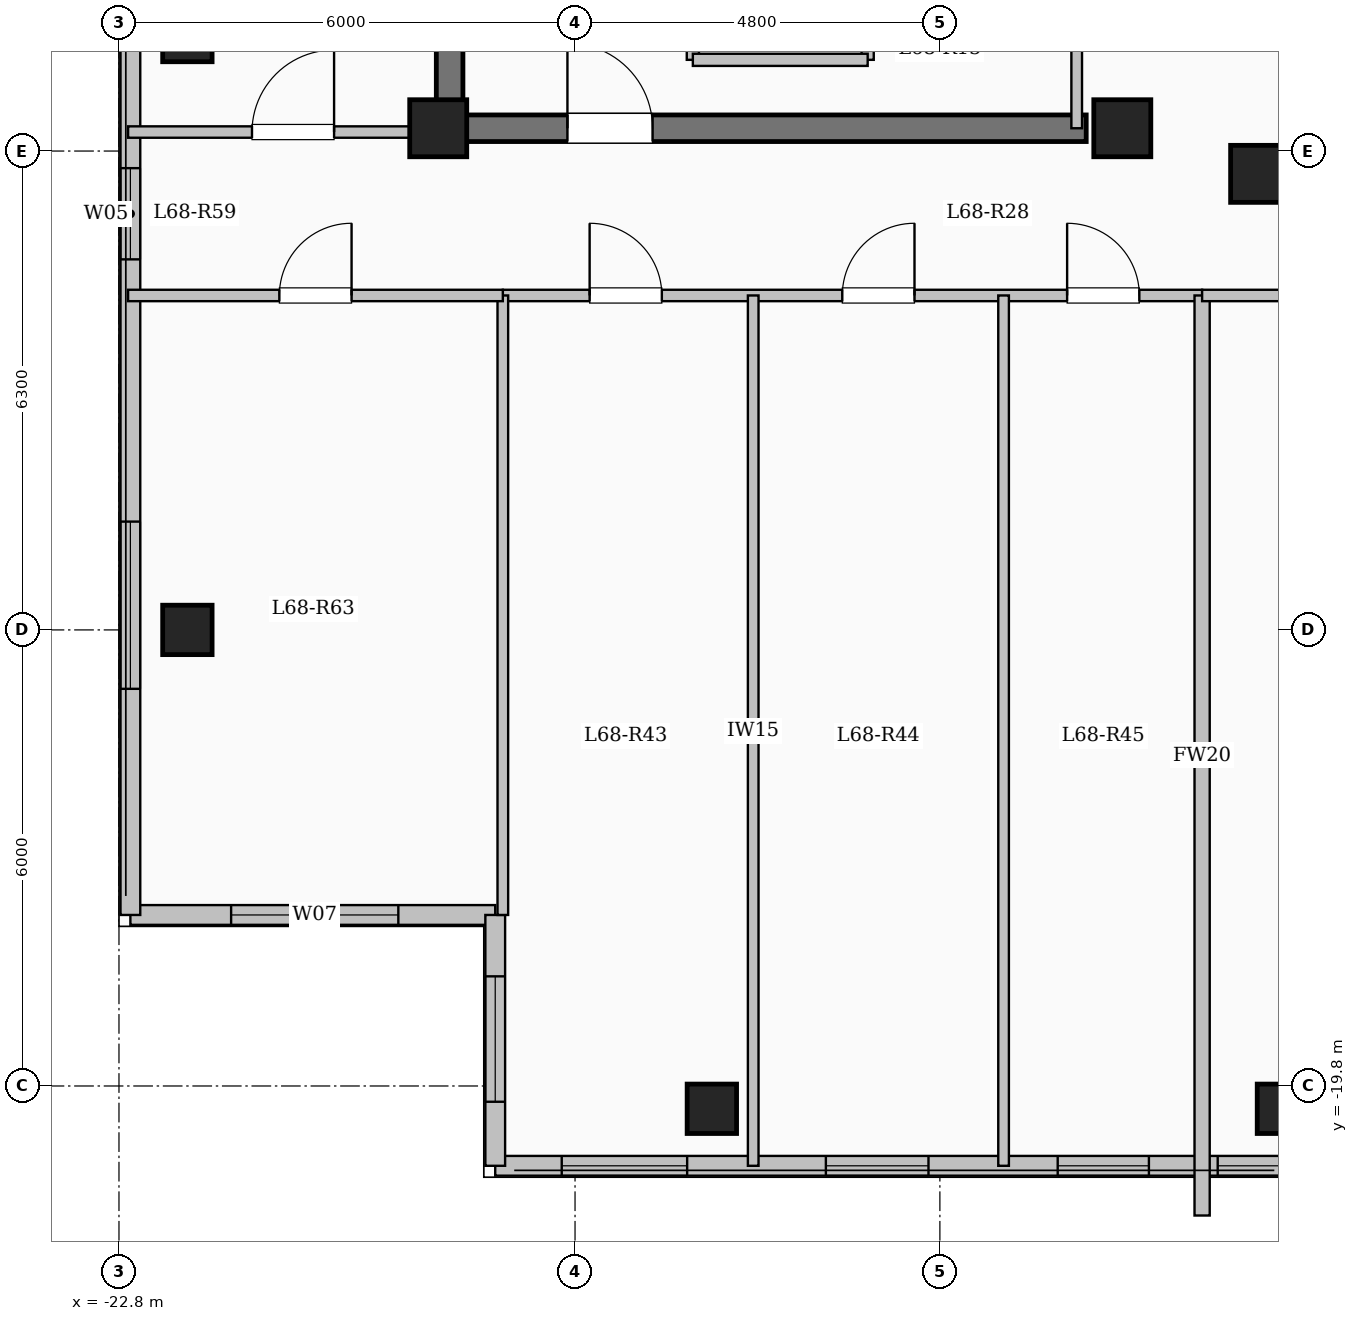
"""IFC4 building model, lengths in metres.
Left out: names, types, materials, properties, quantities, classifications, styles, units other than length and angle.
Written with IfcOpenShell. Run it as: python <this file> out.ifc"""

import sys

from ifc_helpers import new_model, si_unit, direction, frame, frame_2d, origin, origin_2d, place, context, subcontext, project, spatial, rectangle, extrude, element, fill, save


model = new_model("IFC4")
c1 = context("Model", 3, precision=1e-05, world=origin(), true_north=direction((0.0, 1.0)))
c2 = subcontext(c1, "Body", "Model", "MODEL_VIEW")
j1 = project(units=[si_unit("LENGTHUNIT", "METRE"), si_unit("PLANEANGLEUNIT", "RADIAN")], contexts=[c1])
p1 = place(None, origin())
s1 = spatial("IfcSite", under=j1, at=p1, CompositionType="ELEMENT")
p2 = place(p1, origin())
s2 = spatial("IfcBuilding", under=s1, at=p2, CompositionType="ELEMENT")
p3 = place(p2, frame((0.0, 0.0, 251.55)))
s3 = spatial("IfcBuildingStorey", under=s2, at=p3, CompositionType="ELEMENT", Elevation=251.55)
for number, where, z_axis, x_axis in (
    (1, (-7.8, -7.8, 0.0), (0.0, 0.0, 1.0), (1.0, 0.0, 0.0)),
    (2, (-9.6, -7.2, 0.0), (0.0, 0.0, 1.0), (1.0, 0.0, 0.0)),
    (3, (-18.6, -7.2, 0.0), (0.0, 0.0, 1.0), (1.0, 0.0, 0.0)),
):
    element("IfcColumn", number, at=place(p3, frame(where, z_axis=z_axis, x_axis=x_axis)), inside=s3, PredefinedType="COLUMN", context=c2, shape_type="SweptSolid", body=[
        extrude(rectangle(XDim=0.75, YDim=0.75, at=origin_2d()), origin(), (0.0, 0.0, 1.0), 3.35),
    ])
for number, where, z_axis, x_axis in (
    (4, (-15.0, -20.1, 0.0), (0.0, 0.0, 1.0), (1.0, 0.0, 0.0)),
    (5, (-7.5, -20.1, 0.0), (0.0, 0.0, 1.0), (1.0, 0.0, 0.0)),
    (6, (-21.9, -13.8, 0.0), (0.0, 0.0, 1.0), (1.0, 0.0, 0.0)),
    (7, (-21.9, -6.0, 0.0), (0.0, 0.0, 1.0), (1.0, 0.0, 0.0)),
):
    element("IfcColumn", number, at=place(p3, frame(where, z_axis=z_axis, x_axis=x_axis)), inside=s3, PredefinedType="COLUMN", context=c2, shape_type="SweptSolid", body=[
        extrude(rectangle(XDim=0.65, YDim=0.65, at=origin_2d()), origin(), (0.0, 0.0, 1.0), 3.35),
    ])
p4 = place(p3, frame((-17.85, -17.55, 0.0), z_axis=(0.0, 0.0, 1.0), x_axis=(-1.0, 0.0, 0.0)))
e8 = element("IfcWall", 8, at=p4, inside=s3, PredefinedType="SOLIDWALL", context=c2, shape_type="SweptSolid", body=[
    extrude(rectangle(XDim=4.8, YDim=0.26, at=frame_2d((2.4, 0.0))), origin(), (0.0, 0.0, 1.0), 3.1),
])
p5 = place(p4, frame((1.275, 0.0, 0.9)))
e9 = element("IfcOpeningElement", 9, at=p5, cuts=e8, PredefinedType="OPENING", context=c2, shape_type="SweptSolid", body=[
    extrude(rectangle(XDim=2.2, YDim=1.75, at=frame_2d((1.1, 0.875))), frame((0.0, 0.14, 0.0), z_axis=(0.0, -1.0, 0.0), x_axis=(1.0, 0.0, 0.0)), (0.0, 0.0, 1.0), 0.28),
])
p6 = place(p3, frame((-22.65, -17.55, 0.0), z_axis=(0.0, 0.0, 1.0), x_axis=(0.0, 1.0, 0.0)))
e10 = element("IfcWall", 10, at=p6, inside=s3, PredefinedType="SOLIDWALL", context=c2, shape_type="SweptSolid", body=[
    extrude(rectangle(XDim=35.1, YDim=0.26, at=frame_2d((17.55, 0.0))), origin(), (0.0, 0.0, 1.0), 3.1),
])
p7 = place(p6, frame((2.975, 0.0, 0.9)))
e11 = element("IfcOpeningElement", 11, at=p7, cuts=e10, PredefinedType="OPENING", context=c2, shape_type="SweptSolid", body=[
    extrude(rectangle(XDim=2.2, YDim=1.75, at=frame_2d((1.1, 0.875))), frame((0.0, 0.14, 0.0), z_axis=(0.0, -1.0, 0.0), x_axis=(1.0, 0.0, 0.0)), (0.0, 0.0, 1.0), 0.28),
])
p8 = place(p6, frame((8.625, 0.0, 0.95)))
e12 = element("IfcOpeningElement", 12, at=p8, cuts=e10, PredefinedType="OPENING", context=c2, shape_type="SweptSolid", body=[
    extrude(rectangle(XDim=1.2, YDim=1.5, at=frame_2d((0.6, 0.75))), frame((0.0, 0.14, 0.0), z_axis=(0.0, -1.0, 0.0), x_axis=(1.0, 0.0, 0.0)), (0.0, 0.0, 1.0), 0.28),
])
p9 = place(p6, frame((18.3, 0.0, 0.9)))
e13 = element("IfcOpeningElement", 13, at=p9, cuts=e10, PredefinedType="OPENING", context=c2, shape_type="SweptSolid", body=[
    extrude(rectangle(XDim=2.0, YDim=1.7, at=frame_2d((1.0, 0.85))), frame((0.0, 0.14, 0.0), z_axis=(0.0, -1.0, 0.0), x_axis=(1.0, 0.0, 0.0)), (0.0, 0.0, 1.0), 0.28),
])
p10 = place(p6, frame((28.675, 0.0, 0.95)))
e14 = element("IfcOpeningElement", 14, at=p10, cuts=e10, PredefinedType="OPENING", context=c2, shape_type="SweptSolid", body=[
    extrude(rectangle(XDim=1.0, YDim=1.5, at=frame_2d((0.5, 0.75))), frame((0.0, 0.14, 0.0), z_axis=(0.0, -1.0, 0.0), x_axis=(1.0, 0.0, 0.0)), (0.0, 0.0, 1.0), 0.28),
])
p11 = place(p6, frame((31.6, 0.0, 0.9)))
e15 = element("IfcOpeningElement", 15, at=p11, cuts=e10, PredefinedType="OPENING", context=c2, shape_type="SweptSolid", body=[
    extrude(rectangle(XDim=2.0, YDim=1.7, at=frame_2d((1.0, 0.85))), frame((0.0, 0.14, 0.0), z_axis=(0.0, -1.0, 0.0), x_axis=(1.0, 0.0, 0.0)), (0.0, 0.0, 1.0), 0.28),
])
p12 = place(p3, frame((-7.35, -20.85, 0.0), z_axis=(0.0, 0.0, 1.0), x_axis=(-1.0, 0.0, 0.0)))
e16 = element("IfcWall", 16, at=p12, inside=s3, PredefinedType="SOLIDWALL", context=c2, shape_type="SweptSolid", body=[
    extrude(rectangle(XDim=10.5, YDim=0.26, at=frame_2d((5.25, 0.0))), origin(), (0.0, 0.0, 1.0), 3.1),
])
p13 = place(p12, frame((0.145, 0.0, 0.95)))
e17 = element("IfcOpeningElement", 17, at=p13, cuts=e16, PredefinedType="OPENING", context=c2, shape_type="SweptSolid", body=[
    extrude(rectangle(XDim=0.85, YDim=1.5, at=frame_2d((0.425, 0.75))), frame((0.0, 0.14, 0.0), z_axis=(0.0, -1.0, 0.0), x_axis=(1.0, 0.0, 0.0)), (0.0, 0.0, 1.0), 0.28),
])
p14 = place(p12, frame((1.9, 0.0, 0.95)))
e18 = element("IfcOpeningElement", 18, at=p14, cuts=e16, PredefinedType="OPENING", context=c2, shape_type="SweptSolid", body=[
    extrude(rectangle(XDim=1.2, YDim=1.5, at=frame_2d((0.6, 0.75))), frame((0.0, 0.14, 0.0), z_axis=(0.0, -1.0, 0.0), x_axis=(1.0, 0.0, 0.0)), (0.0, 0.0, 1.0), 0.28),
])
p15 = place(p12, frame((4.8, 0.0, 0.95)))
e19 = element("IfcOpeningElement", 19, at=p15, cuts=e16, PredefinedType="OPENING", context=c2, shape_type="SweptSolid", body=[
    extrude(rectangle(XDim=1.35, YDim=1.55, at=frame_2d((0.675, 0.775))), frame((0.0, 0.14, 0.0), z_axis=(0.0, -1.0, 0.0), x_axis=(1.0, 0.0, 0.0)), (0.0, 0.0, 1.0), 0.28),
])
p16 = place(p12, frame((7.975, 0.0, 0.9)))
e20 = element("IfcOpeningElement", 20, at=p16, cuts=e16, PredefinedType="OPENING", context=c2, shape_type="SweptSolid", body=[
    extrude(rectangle(XDim=1.65, YDim=1.6, at=frame_2d((0.825, 0.8))), frame((0.0, 0.14, 0.0), z_axis=(0.0, -1.0, 0.0), x_axis=(1.0, 0.0, 0.0)), (0.0, 0.0, 1.0), 0.28),
])
p17 = place(p3, frame((-17.85, -20.85, 0.0), z_axis=(0.0, 0.0, 1.0), x_axis=(0.0, 1.0, 0.0)))
e21 = element("IfcWall", 21, at=p17, inside=s3, PredefinedType="SOLIDWALL", context=c2, shape_type="SweptSolid", body=[
    extrude(rectangle(XDim=3.3, YDim=0.26, at=frame_2d((1.65, 0.0))), origin(), (0.0, 0.0, 1.0), 3.1),
])
p18 = place(p17, frame((0.843, 0.0, 0.9)))
e22 = element("IfcOpeningElement", 22, at=p18, cuts=e21, PredefinedType="OPENING", context=c2, shape_type="SweptSolid", body=[
    extrude(rectangle(XDim=1.65, YDim=1.6, at=frame_2d((0.825, 0.8))), frame((0.0, 0.14, 0.0), z_axis=(0.0, -1.0, 0.0), x_axis=(1.0, 0.0, 0.0)), (0.0, 0.0, 1.0), 0.28),
])
p19 = place(p3, frame((-15.25, -6.3, 0.0), z_axis=(0.0, 0.0, 1.0), x_axis=(0.0, 1.0, 0.0)))
e23 = element("IfcWall", 23, at=p19, inside=s3, PredefinedType="SOLIDWALL", context=c2, shape_type="SweptSolid", body=[
    extrude(rectangle(XDim=2.6, YDim=0.16, at=frame_2d((1.3, 0.0))), origin(), (0.0, 0.0, 1.0), 3.1),
])
p20 = place(p19, frame((0.75, 0.0, 0.0)))
e24 = element("IfcOpeningElement", 24, at=p20, cuts=e23, PredefinedType="OPENING", context=c2, shape_type="SweptSolid", body=[
    extrude(rectangle(XDim=1.1, YDim=2.15, at=frame_2d((0.55, 1.075))), frame((0.0, 0.09, 0.0), z_axis=(0.0, -1.0, 0.0), x_axis=(1.0, 0.0, 0.0)), (0.0, 0.0, 1.0), 0.18),
])
p21 = place(p3, frame((-12.95, -6.3, 0.0), z_axis=(0.0, 0.0, 1.0), x_axis=(0.0, 1.0, 0.0)))
e25 = element("IfcWall", 25, at=p21, inside=s3, PredefinedType="SOLIDWALL", context=c2, shape_type="SweptSolid", body=[
    extrude(rectangle(XDim=2.6, YDim=0.16, at=frame_2d((1.3, 0.0))), origin(), (0.0, 0.0, 1.0), 3.1),
])
p22 = place(p3, frame((-15.25, -6.3, 0.0), z_axis=(0.0, 0.0, 1.0), x_axis=(1.0, 0.0, 0.0)))
e26 = element("IfcWall", 26, at=p22, inside=s3, PredefinedType="SOLIDWALL", context=c2, shape_type="SweptSolid", body=[
    extrude(rectangle(XDim=2.3, YDim=0.16, at=frame_2d((1.15, 0.0))), origin(), (0.0, 0.0, 1.0), 3.1),
])
p23 = place(p3, frame((-18.45, -7.375, 0.0), z_axis=(0.0, 0.0, 1.0), x_axis=(0.0, 1.0, 0.0)))
e27 = element("IfcWall", 27, at=p23, inside=s3, PredefinedType="SHEAR", context=c2, shape_type="SweptSolid", body=[
    extrude(rectangle(XDim=14.05, YDim=0.35, at=frame_2d((7.025, 0.0))), origin(), (0.0, 0.0, 1.0), 3.35),
])
p24 = place(p3, frame((-18.625, -7.2, 0.0), z_axis=(0.0, 0.0, 1.0), x_axis=(1.0, 0.0, 0.0)))
e28 = element("IfcWall", 28, at=p24, inside=s3, PredefinedType="SHEAR", context=c2, shape_type="SweptSolid", body=[
    extrude(rectangle(XDim=8.55, YDim=0.35, at=frame_2d((4.275, 0.0))), origin(), (0.0, 0.0, 1.0), 3.35),
])
p25 = place(p24, frame((1.725, 0.0, 0.0)))
e29 = element("IfcOpeningElement", 29, at=p25, cuts=e28, PredefinedType="OPENING", context=c2, shape_type="SweptSolid", body=[
    extrude(rectangle(XDim=1.12, YDim=2.15, at=frame_2d((0.56, 1.075))), frame((0.0, 0.185, 0.0), z_axis=(0.0, -1.0, 0.0), x_axis=(1.0, 0.0, 0.0)), (0.0, 0.0, 1.0), 0.37),
])
p26 = place(p3, frame((-10.2, -7.2, 0.0), z_axis=(0.0, 0.0, 1.0), x_axis=(0.0, 1.0, 0.0)))
e30 = element("IfcWall", 30, at=p26, inside=s3, PredefinedType="PARTITIONING", context=c2, shape_type="SweptSolid", body=[
    extrude(rectangle(XDim=9.12, YDim=0.14, at=frame_2d((4.56, 0.0))), origin(), (0.0, 0.0, 1.0), 3.1),
])
p27 = place(p26, frame((1.6, 0.0, 0.0)))
e31 = element("IfcOpeningElement", 31, at=p27, cuts=e30, PredefinedType="OPENING", context=c2, shape_type="SweptSolid", body=[
    extrude(rectangle(XDim=0.95, YDim=2.12, at=frame_2d((0.475, 1.06))), frame((0.0, 0.08, 0.0), z_axis=(0.0, -1.0, 0.0), x_axis=(1.0, 0.0, 0.0)), (0.0, 0.0, 1.0), 0.16),
])
p28 = place(p26, frame((5.0, 0.0, 0.0)))
e32 = element("IfcOpeningElement", 32, at=p28, cuts=e30, PredefinedType="OPENING", context=c2, shape_type="SweptSolid", body=[
    extrude(rectangle(XDim=0.95, YDim=2.12, at=frame_2d((0.475, 1.06))), frame((0.0, 0.08, 0.0), z_axis=(0.0, -1.0, 0.0), x_axis=(1.0, 0.0, 0.0)), (0.0, 0.0, 1.0), 0.16),
])
p29 = place(p3, frame((-17.75, -9.4, 0.0), z_axis=(0.0, 0.0, 1.0), x_axis=(1.0, 0.0, 0.0)))
e33 = element("IfcWall", 33, at=p29, inside=s3, PredefinedType="PARTITIONING", context=c2, shape_type="SweptSolid", body=[
    extrude(rectangle(XDim=9.2, YDim=0.15, at=frame_2d((4.6, 0.0))), origin(), (0.0, 0.0, 1.0), 3.1),
])
p30 = place(p29, frame((1.142, 0.0, 0.0)))
e34 = element("IfcOpeningElement", 34, at=p30, cuts=e33, PredefinedType="OPENING", context=c2, shape_type="SweptSolid", body=[
    extrude(rectangle(XDim=0.95, YDim=2.15, at=frame_2d((0.475, 1.075))), frame((0.0, 0.085, 0.0), z_axis=(0.0, -1.0, 0.0), x_axis=(1.0, 0.0, 0.0)), (0.0, 0.0, 1.0), 0.17),
])
p31 = place(p29, frame((4.466, 0.0, 0.0)))
e35 = element("IfcOpeningElement", 35, at=p31, cuts=e33, PredefinedType="OPENING", context=c2, shape_type="SweptSolid", body=[
    extrude(rectangle(XDim=0.95, YDim=2.15, at=frame_2d((0.475, 1.075))), frame((0.0, 0.085, 0.0), z_axis=(0.0, -1.0, 0.0), x_axis=(1.0, 0.0, 0.0)), (0.0, 0.0, 1.0), 0.17),
])
p32 = place(p29, frame((7.424, 0.0, 0.0)))
e36 = element("IfcOpeningElement", 36, at=p32, cuts=e33, PredefinedType="OPENING", context=c2, shape_type="SweptSolid", body=[
    extrude(rectangle(XDim=0.95, YDim=2.15, at=frame_2d((0.475, 1.075))), frame((0.0, 0.085, 0.0), z_axis=(0.0, -1.0, 0.0), x_axis=(1.0, 0.0, 0.0)), (0.0, 0.0, 1.0), 0.17),
])
for number, where, z_axis, x_axis in (
    (37, (-14.456, -20.85, 0.0), (0.0, 0.0, 1.0), (0.0, 1.0, 0.0)),
    (38, (-11.162, -20.85, 0.0), (0.0, 0.0, 1.0), (0.0, 1.0, 0.0)),
):
    element("IfcWall", number, at=place(p3, frame(where, z_axis=z_axis, x_axis=x_axis)), inside=s3, PredefinedType="PARTITIONING", context=c2, shape_type="SweptSolid", body=[
        extrude(rectangle(XDim=11.45, YDim=0.14, at=frame_2d((5.725, 0.0))), origin(), (0.0, 0.0, 1.0), 3.1),
    ])
p33 = place(p3, frame((-8.55, -21.504, 0.0), z_axis=(0.0, 0.0, 1.0), x_axis=(0.0, 1.0, 0.0)))
e39 = element("IfcWall", 39, at=p33, inside=s3, PredefinedType="SOLIDWALL", context=c2, shape_type="SweptSolid", body=[
    extrude(rectangle(XDim=12.104, YDim=0.2, at=frame_2d((6.052, 0.0))), origin(), (0.0, 0.0, 1.0), 3.1),
])
p34 = place(p3, frame((-8.55, -9.4, 0.0), z_axis=(0.0, 0.0, 1.0), x_axis=(1.0, 0.0, 0.0)))
e40 = element("IfcWall", 40, at=p34, inside=s3, PredefinedType="PARTITIONING", context=c2, shape_type="SweptSolid", body=[
    extrude(rectangle(XDim=17.1, YDim=0.15, at=frame_2d((8.55, 0.0))), origin(), (0.0, 0.0, 1.0), 3.1),
])
p35 = place(p34, frame((1.75, 0.0, 0.0)))
e41 = element("IfcOpeningElement", 41, at=p35, cuts=e40, PredefinedType="OPENING", context=c2, shape_type="SweptSolid", body=[
    extrude(rectangle(XDim=0.96, YDim=2.15, at=frame_2d((0.48, 1.075))), frame((0.0, 0.085, 0.0), z_axis=(0.0, -1.0, 0.0), x_axis=(1.0, 0.0, 0.0)), (0.0, 0.0, 1.0), 0.17),
])
p36 = place(p3, frame((-22.68, -7.25, 0.0), z_axis=(0.0, 0.0, 1.0), x_axis=(1.0, 0.0, 0.0)))
e42 = element("IfcWall", 42, at=p36, inside=s3, PredefinedType="PARTITIONING", context=c2, shape_type="SweptSolid", body=[
    extrude(rectangle(XDim=4.23, YDim=0.15, at=frame_2d((2.115, 0.0))), origin(), (0.0, 0.0, 1.0), 3.1),
])
p37 = place(p36, frame((1.63, 0.0, 0.0)))
e43 = element("IfcOpeningElement", 43, at=p37, cuts=e42, PredefinedType="OPENING", context=c2, shape_type="SweptSolid", body=[
    extrude(rectangle(XDim=1.08, YDim=2.15, at=frame_2d((0.54, 1.075))), frame((0.0, 0.085, 0.0), z_axis=(0.0, -1.0, 0.0), x_axis=(1.0, 0.0, 0.0)), (0.0, 0.0, 1.0), 0.17),
])
p38 = place(p3, frame((-17.75, -17.55, 0.0), z_axis=(0.0, 0.0, 1.0), x_axis=(0.0, 1.0, 0.0)))
e44 = element("IfcWall", 44, at=p38, inside=s3, PredefinedType="PARTITIONING", context=c2, shape_type="SweptSolid", body=[
    extrude(rectangle(XDim=8.15, YDim=0.14, at=frame_2d((4.075, 0.0))), origin(), (0.0, 0.0, 1.0), 3.1),
])
p39 = place(p3, frame((-22.68, -9.4, 0.0), z_axis=(0.0, 0.0, 1.0), x_axis=(1.0, 0.0, 0.0)))
e45 = element("IfcWall", 45, at=p39, inside=s3, PredefinedType="PARTITIONING", context=c2, shape_type="SweptSolid", body=[
    extrude(rectangle(XDim=4.93, YDim=0.15, at=frame_2d((2.465, 0.0))), origin(), (0.0, 0.0, 1.0), 3.1),
])
p40 = place(p39, frame((1.99, 0.0, 0.0)))
e46 = element("IfcOpeningElement", 46, at=p40, cuts=e45, PredefinedType="OPENING", context=c2, shape_type="SweptSolid", body=[
    extrude(rectangle(XDim=0.95, YDim=2.15, at=frame_2d((0.475, 1.075))), frame((0.0, 0.085, 0.0), z_axis=(0.0, -1.0, 0.0), x_axis=(1.0, 0.0, 0.0)), (0.0, 0.0, 1.0), 0.17),
])
p41 = place(p5, origin())
e47 = element("IfcWindow", 47, at=p41, inside=s3, PartitioningType="SINGLE_PANEL", PredefinedType="WINDOW", context=c2, shape_type="SweptSolid", body=[
    extrude(rectangle(XDim=2.2, YDim=1.75, at=frame_2d((1.1, 0.875))), frame((0.0, 0.03, 0.0), z_axis=(0.0, -1.0, 0.0), x_axis=(1.0, 0.0, 0.0)), (0.0, 0.0, 1.0), 0.06),
])
fill(e9, e47)
p42 = place(p7, origin())
e48 = element("IfcWindow", 48, at=p42, inside=s3, PartitioningType="SINGLE_PANEL", PredefinedType="WINDOW", context=c2, shape_type="SweptSolid", body=[
    extrude(rectangle(XDim=2.2, YDim=1.75, at=frame_2d((1.1, 0.875))), frame((0.0, 0.03, 0.0), z_axis=(0.0, -1.0, 0.0), x_axis=(1.0, 0.0, 0.0)), (0.0, 0.0, 1.0), 0.06),
])
fill(e11, e48)
p43 = place(p8, origin())
e49 = element("IfcWindow", 49, at=p43, inside=s3, PartitioningType="SINGLE_PANEL", PredefinedType="WINDOW", context=c2, shape_type="SweptSolid", body=[
    extrude(rectangle(XDim=1.2, YDim=1.5, at=frame_2d((0.6, 0.75))), frame((0.0, 0.03, 0.0), z_axis=(0.0, -1.0, 0.0), x_axis=(1.0, 0.0, 0.0)), (0.0, 0.0, 1.0), 0.06),
])
fill(e12, e49)
p44 = place(p13, origin())
e50 = element("IfcWindow", 50, at=p44, inside=s3, PartitioningType="SINGLE_PANEL", PredefinedType="WINDOW", context=c2, shape_type="SweptSolid", body=[
    extrude(rectangle(XDim=0.85, YDim=1.5, at=frame_2d((0.425, 0.75))), frame((0.0, 0.03, 0.0), z_axis=(0.0, -1.0, 0.0), x_axis=(1.0, 0.0, 0.0)), (0.0, 0.0, 1.0), 0.06),
])
fill(e17, e50)
p45 = place(p14, origin())
e51 = element("IfcWindow", 51, at=p45, inside=s3, PartitioningType="SINGLE_PANEL", PredefinedType="WINDOW", context=c2, shape_type="SweptSolid", body=[
    extrude(rectangle(XDim=1.2, YDim=1.5, at=frame_2d((0.6, 0.75))), frame((0.0, 0.03, 0.0), z_axis=(0.0, -1.0, 0.0), x_axis=(1.0, 0.0, 0.0)), (0.0, 0.0, 1.0), 0.06),
])
fill(e18, e51)
p46 = place(p15, origin())
e52 = element("IfcWindow", 52, at=p46, inside=s3, PartitioningType="SINGLE_PANEL", PredefinedType="WINDOW", context=c2, shape_type="SweptSolid", body=[
    extrude(rectangle(XDim=1.35, YDim=1.55, at=frame_2d((0.675, 0.775))), frame((0.0, 0.03, 0.0), z_axis=(0.0, -1.0, 0.0), x_axis=(1.0, 0.0, 0.0)), (0.0, 0.0, 1.0), 0.06),
])
fill(e19, e52)
p47 = place(p16, origin())
e53 = element("IfcWindow", 53, at=p47, inside=s3, PartitioningType="SINGLE_PANEL", PredefinedType="WINDOW", context=c2, shape_type="SweptSolid", body=[
    extrude(rectangle(XDim=1.65, YDim=1.6, at=frame_2d((0.825, 0.8))), frame((0.0, 0.03, 0.0), z_axis=(0.0, -1.0, 0.0), x_axis=(1.0, 0.0, 0.0)), (0.0, 0.0, 1.0), 0.06),
])
fill(e20, e53)
p48 = place(p18, origin())
e54 = element("IfcWindow", 54, at=p48, inside=s3, PartitioningType="SINGLE_PANEL", PredefinedType="WINDOW", context=c2, shape_type="SweptSolid", body=[
    extrude(rectangle(XDim=1.65, YDim=1.6, at=frame_2d((0.825, 0.8))), frame((0.0, 0.03, 0.0), z_axis=(0.0, -1.0, 0.0), x_axis=(1.0, 0.0, 0.0)), (0.0, 0.0, 1.0), 0.06),
])
fill(e22, e54)
p49 = place(p25, origin())
e55 = element("IfcDoor", 55, at=p49, inside=s3, OperationType="SINGLE_SWING_LEFT", PredefinedType="DOOR", context=c2, shape_type="SweptSolid", body=[
    extrude(rectangle(XDim=1.12, YDim=2.15, at=frame_2d((0.56, 1.075))), frame((0.0, 0.025, 0.0), z_axis=(0.0, -1.0, 0.0), x_axis=(1.0, 0.0, 0.0)), (0.0, 0.0, 1.0), 0.05),
])
fill(e29, e55)
p50 = place(p30, origin())
e56 = element("IfcDoor", 56, at=p50, inside=s3, OperationType="SINGLE_SWING_LEFT", PredefinedType="DOOR", context=c2, shape_type="SweptSolid", body=[
    extrude(rectangle(XDim=0.95, YDim=2.15, at=frame_2d((0.475, 1.075))), frame((0.0, 0.025, 0.0), z_axis=(0.0, -1.0, 0.0), x_axis=(1.0, 0.0, 0.0)), (0.0, 0.0, 1.0), 0.05),
])
fill(e34, e56)
p51 = place(p31, origin())
e57 = element("IfcDoor", 57, at=p51, inside=s3, OperationType="SINGLE_SWING_RIGHT", PredefinedType="DOOR", context=c2, shape_type="SweptSolid", body=[
    extrude(rectangle(XDim=0.95, YDim=2.15, at=frame_2d((0.475, 1.075))), frame((0.0, 0.025, 0.0), z_axis=(0.0, -1.0, 0.0), x_axis=(1.0, 0.0, 0.0)), (0.0, 0.0, 1.0), 0.05),
])
fill(e35, e57)
p52 = place(p32, origin())
e58 = element("IfcDoor", 58, at=p52, inside=s3, OperationType="SINGLE_SWING_LEFT", PredefinedType="DOOR", context=c2, shape_type="SweptSolid", body=[
    extrude(rectangle(XDim=0.95, YDim=2.15, at=frame_2d((0.475, 1.075))), frame((0.0, 0.025, 0.0), z_axis=(0.0, -1.0, 0.0), x_axis=(1.0, 0.0, 0.0)), (0.0, 0.0, 1.0), 0.05),
])
fill(e36, e58)
p53 = place(p40, origin())
e59 = element("IfcDoor", 59, at=p53, inside=s3, OperationType="SINGLE_SWING_RIGHT", PredefinedType="DOOR", context=c2, shape_type="SweptSolid", body=[
    extrude(rectangle(XDim=0.95, YDim=2.15, at=frame_2d((0.475, 1.075))), frame((0.0, 0.025, 0.0), z_axis=(0.0, -1.0, 0.0), x_axis=(1.0, 0.0, 0.0)), (0.0, 0.0, 1.0), 0.05),
])
fill(e46, e59)
p54 = place(p37, origin())
e60 = element("IfcDoor", 60, at=p54, inside=s3, OperationType="SINGLE_SWING_RIGHT", PredefinedType="DOOR", context=c2, shape_type="SweptSolid", body=[
    extrude(rectangle(XDim=1.08, YDim=2.15, at=frame_2d((0.54, 1.075))), frame((0.0, 0.025, 0.0), z_axis=(0.0, -1.0, 0.0), x_axis=(1.0, 0.0, 0.0)), (0.0, 0.0, 1.0), 0.05),
])
fill(e43, e60)
save(model, sys.argv[1])
